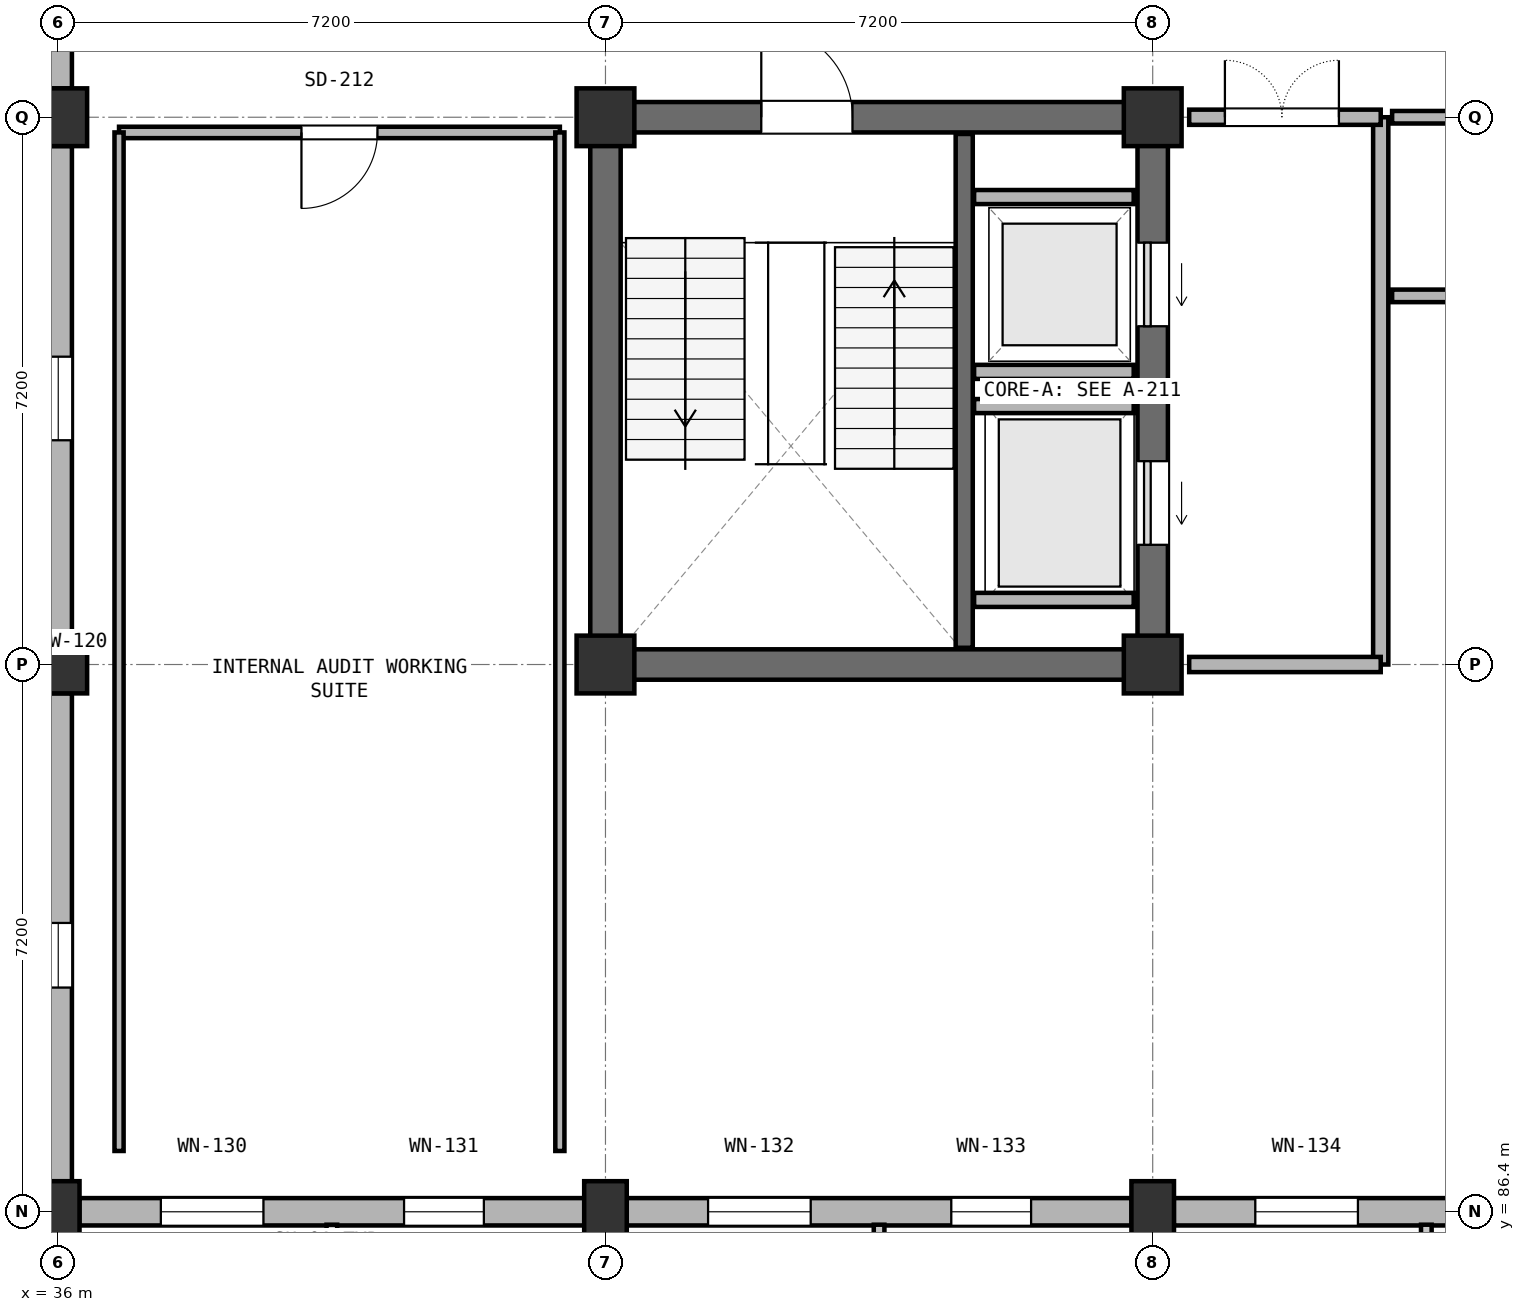
"""IFC4 building model, lengths in metres.
Left out: names, types, materials, properties, quantities, classifications, styles, units other than length and angle.
Written with IfcOpenShell. Run it as: python <this file> out.ifc"""

import sys

from ifc_helpers import new_model, si_unit, direction, frame, frame_2d, origin, origin_2d, place, context, subcontext, project, spatial, rectangle, extrude, element, fill, save


model = new_model("IFC4")
c1 = context("Model", 3, precision=1e-05, world=origin(), true_north=direction((0.0, 1.0)))
c2 = subcontext(c1, "Body", "Model", "MODEL_VIEW")
j1 = project(units=[si_unit("LENGTHUNIT", "METRE"), si_unit("PLANEANGLEUNIT", "RADIAN")], contexts=[c1])
p1 = place(None, origin())
s1 = spatial("IfcSite", under=j1, at=p1, CompositionType="ELEMENT")
p2 = place(p1, origin())
s2 = spatial("IfcBuilding", under=s1, at=p2, CompositionType="ELEMENT")
p3 = place(p2, frame((0.0, 0.0, 18.6)))
s3 = spatial("IfcBuildingStorey", under=s2, at=p3, CompositionType="ELEMENT", Elevation=18.6)
p4 = place(p3, frame((36.0, 86.4, 0.0), z_axis=(0.0, 0.0, 1.0), x_axis=(1.0, 0.0, 0.0)))
e1 = element("IfcColumn", 1, at=p4, inside=s3, PredefinedType="COLUMN", context=c2, shape_type="SweptSolid", body=[
    extrude(rectangle(XDim=0.56, YDim=0.805, at=origin_2d()), origin(), (0.0, 0.0, 1.0), 3.9),
])
for number, where, z_axis, x_axis in (
    (2, (36.0, 93.6, 0.0), (0.0, 0.0, 1.0), (1.0, 0.0, 0.0)),
    (3, (36.0, 100.8, 0.0), (0.0, 0.0, 1.0), (1.0, 0.0, 0.0)),
):
    element("IfcColumn", number, at=place(p3, frame(where, z_axis=z_axis, x_axis=x_axis)), inside=s3, PredefinedType="COLUMN", context=c2, shape_type="SweptSolid", body=[
        extrude(rectangle(XDim=0.76, YDim=0.76, at=origin_2d()), origin(), (0.0, 0.0, 1.0), 3.9),
    ])
p5 = place(p3, frame((43.2, 86.4, 0.0), z_axis=(0.0, 0.0, 1.0), x_axis=(1.0, 0.0, 0.0)))
e4 = element("IfcColumn", 4, at=p5, inside=s3, PredefinedType="COLUMN", context=c2, shape_type="SweptSolid", body=[
    extrude(rectangle(XDim=0.56, YDim=0.805, at=origin_2d()), origin(), (0.0, 0.0, 1.0), 3.9),
])
for number, where, z_axis, x_axis in (
    (5, (43.2, 93.6, 0.0), (0.0, 0.0, 1.0), (1.0, 0.0, 0.0)),
    (6, (43.2, 100.8, 0.0), (0.0, 0.0, 1.0), (1.0, 0.0, 0.0)),
):
    element("IfcColumn", number, at=place(p3, frame(where, z_axis=z_axis, x_axis=x_axis)), inside=s3, PredefinedType="COLUMN", context=c2, shape_type="SweptSolid", body=[
        extrude(rectangle(XDim=0.76, YDim=0.76, at=origin_2d()), origin(), (0.0, 0.0, 1.0), 3.9),
    ])
p6 = place(p3, frame((50.4, 86.4, 0.0), z_axis=(0.0, 0.0, 1.0), x_axis=(1.0, 0.0, 0.0)))
e7 = element("IfcColumn", 7, at=p6, inside=s3, PredefinedType="COLUMN", context=c2, shape_type="SweptSolid", body=[
    extrude(rectangle(XDim=0.56, YDim=0.805, at=origin_2d()), origin(), (0.0, 0.0, 1.0), 3.9),
])
for number, where, z_axis, x_axis in (
    (8, (50.4, 93.6, 0.0), (0.0, 0.0, 1.0), (1.0, 0.0, 0.0)),
    (9, (50.4, 100.8, 0.0), (0.0, 0.0, 1.0), (1.0, 0.0, 0.0)),
):
    element("IfcColumn", number, at=place(p3, frame(where, z_axis=z_axis, x_axis=x_axis)), inside=s3, PredefinedType="COLUMN", context=c2, shape_type="SweptSolid", body=[
        extrude(rectangle(XDim=0.76, YDim=0.76, at=origin_2d()), origin(), (0.0, 0.0, 1.0), 3.9),
    ])
p7 = place(p3, frame((43.55, 93.6, 0.0), z_axis=(0.0, 0.0, 1.0), x_axis=(1.0, 0.0, 0.0)))
e10 = element("IfcWall", 10, at=p7, inside=s3, PredefinedType="SHEAR", context=c2, shape_type="SweptSolid", body=[
    extrude(rectangle(XDim=6.5, YDim=0.4, at=frame_2d((3.25, 0.0))), origin(), (0.0, 0.0, 1.0), 3.9),
])
p8 = place(p3, frame((50.4, 93.95, 0.0), z_axis=(0.0, 0.0, 1.0), x_axis=(0.0, 1.0, 0.0)))
e11 = element("IfcWall", 11, at=p8, inside=s3, PredefinedType="SHEAR", context=c2, shape_type="SweptSolid", body=[
    extrude(rectangle(XDim=6.5, YDim=0.4, at=frame_2d((3.25, 0.0))), origin(), (0.0, 0.0, 1.0), 3.9),
])
p9 = place(p8, frame((1.225, 0.0, 0.0)))
e12 = element("IfcOpeningElement", 12, at=p9, cuts=e11, PredefinedType="OPENING", context=c2, shape_type="SweptSolid", body=[
    extrude(rectangle(XDim=1.1, YDim=2.2, at=frame_2d((0.55, 1.1))), frame((0.0, 0.21, 0.0), z_axis=(0.0, -1.0, 0.0), x_axis=(1.0, 0.0, 0.0)), (0.0, 0.0, 1.0), 0.42),
])
p10 = place(p8, frame((4.1, 0.0, 0.0)))
e13 = element("IfcOpeningElement", 13, at=p10, cuts=e11, PredefinedType="OPENING", context=c2, shape_type="SweptSolid", body=[
    extrude(rectangle(XDim=1.1, YDim=2.2, at=frame_2d((0.55, 1.1))), frame((0.0, 0.21, 0.0), z_axis=(0.0, -1.0, 0.0), x_axis=(1.0, 0.0, 0.0)), (0.0, 0.0, 1.0), 0.42),
])
p11 = place(p3, frame((50.05, 100.8, 0.0), z_axis=(0.0, 0.0, 1.0), x_axis=(-1.0, 0.0, 0.0)))
e14 = element("IfcWall", 14, at=p11, inside=s3, PredefinedType="SHEAR", context=c2, shape_type="SweptSolid", body=[
    extrude(rectangle(XDim=6.5, YDim=0.4, at=frame_2d((3.25, 0.0))), origin(), (0.0, 0.0, 1.0), 3.9),
])
p12 = place(p11, frame((3.6, 0.0, 0.0)))
e15 = element("IfcOpeningElement", 15, at=p12, cuts=e14, PredefinedType="OPENING", context=c2, shape_type="SweptSolid", body=[
    extrude(rectangle(XDim=1.2, YDim=2.2, at=frame_2d((0.6, 1.1))), frame((0.0, 0.21, 0.0), z_axis=(0.0, -1.0, 0.0), x_axis=(1.0, 0.0, 0.0)), (0.0, 0.0, 1.0), 0.42),
])
p13 = place(p3, frame((43.2, 100.45, 0.0), z_axis=(0.0, 0.0, 1.0), x_axis=(0.0, -1.0, 0.0)))
e16 = element("IfcWall", 16, at=p13, inside=s3, PredefinedType="SHEAR", context=c2, shape_type="SweptSolid", body=[
    extrude(rectangle(XDim=6.5, YDim=0.4, at=frame_2d((3.25, 0.0))), origin(), (0.0, 0.0, 1.0), 3.9),
])
p14 = place(p3, frame((47.92, 93.82, 0.0), z_axis=(0.0, 0.0, 1.0), x_axis=(0.0, 1.0, 0.0)))
e17 = element("IfcWall", 17, at=p14, inside=s3, PredefinedType="SHEAR", context=c2, shape_type="SweptSolid", body=[
    extrude(rectangle(XDim=6.76, YDim=0.225, at=frame_2d((3.38, 0.0))), origin(), (0.0, 0.0, 1.0), 3.9),
])
for number, where, z_axis, x_axis in (
    (18, (48.05, 94.45, 0.0), (0.0, 0.0, 1.0), (1.0, 0.0, 0.0)),
    (19, (48.05, 97.0, 0.0), (0.0, 0.0, 1.0), (1.0, 0.0, 0.0)),
    (20, (48.05, 97.45, 0.0), (0.0, 0.0, 1.0), (1.0, 0.0, 0.0)),
    (21, (48.05, 99.75, 0.0), (0.0, 0.0, 1.0), (1.0, 0.0, 0.0)),
):
    element("IfcWall", number, at=place(p3, frame(where, z_axis=z_axis, x_axis=x_axis)), inside=s3, PredefinedType="PARTITIONING", context=c2, shape_type="SweptSolid", body=[
        extrude(rectangle(XDim=2.1, YDim=0.185, at=frame_2d((1.05, 0.0))), origin(), (0.0, 0.0, 1.0), 3.9),
    ])
p15 = place(p3, frame((36.278, 86.4, 0.0), z_axis=(0.0, 0.0, 1.0), x_axis=(1.0, 0.0, 0.0)))
e22 = element("IfcWall", 22, at=p15, inside=s3, PredefinedType="SOLIDWALL", context=c2, shape_type="SweptSolid", body=[
    extrude(rectangle(XDim=6.644, YDim=0.36, at=frame_2d((3.322, 0.0))), origin(), (0.0, 0.0, 1.0), 2.74),
])
p16 = place(p15, frame((1.072, 0.0, 0.7)))
e23 = element("IfcOpeningElement", 23, at=p16, cuts=e22, PredefinedType="OPENING", context=c2, shape_type="SweptSolid", body=[
    extrude(rectangle(XDim=1.35, YDim=1.89, at=frame_2d((0.675, 0.945))), frame((0.0, 0.19, 0.0), z_axis=(0.0, -1.0, 0.0), x_axis=(1.0, 0.0, 0.0)), (0.0, 0.0, 1.0), 0.38),
])
p17 = place(p15, frame((4.272, 0.0, 0.7)))
e24 = element("IfcOpeningElement", 24, at=p17, cuts=e22, PredefinedType="OPENING", context=c2, shape_type="SweptSolid", body=[
    extrude(rectangle(XDim=1.05, YDim=1.89, at=frame_2d((0.525, 0.945))), frame((0.0, 0.19, 0.0), z_axis=(0.0, -1.0, 0.0), x_axis=(1.0, 0.0, 0.0)), (0.0, 0.0, 1.0), 0.38),
])
p18 = place(p3, frame((43.478, 86.4, 0.0), z_axis=(0.0, 0.0, 1.0), x_axis=(1.0, 0.0, 0.0)))
e25 = element("IfcWall", 25, at=p18, inside=s3, PredefinedType="SOLIDWALL", context=c2, shape_type="SweptSolid", body=[
    extrude(rectangle(XDim=6.644, YDim=0.36, at=frame_2d((3.322, 0.0))), origin(), (0.0, 0.0, 1.0), 2.74),
])
p19 = place(p18, frame((1.072, 0.0, 0.7)))
e26 = element("IfcOpeningElement", 26, at=p19, cuts=e25, PredefinedType="OPENING", context=c2, shape_type="SweptSolid", body=[
    extrude(rectangle(XDim=1.35, YDim=1.89, at=frame_2d((0.675, 0.945))), frame((0.0, 0.19, 0.0), z_axis=(0.0, -1.0, 0.0), x_axis=(1.0, 0.0, 0.0)), (0.0, 0.0, 1.0), 0.38),
])
p20 = place(p18, frame((4.272, 0.0, 0.7)))
e27 = element("IfcOpeningElement", 27, at=p20, cuts=e25, PredefinedType="OPENING", context=c2, shape_type="SweptSolid", body=[
    extrude(rectangle(XDim=1.05, YDim=1.89, at=frame_2d((0.525, 0.945))), frame((0.0, 0.19, 0.0), z_axis=(0.0, -1.0, 0.0), x_axis=(1.0, 0.0, 0.0)), (0.0, 0.0, 1.0), 0.38),
])
p21 = place(p3, frame((50.678, 86.4, 0.0), z_axis=(0.0, 0.0, 1.0), x_axis=(1.0, 0.0, 0.0)))
e28 = element("IfcWall", 28, at=p21, inside=s3, PredefinedType="SOLIDWALL", context=c2, shape_type="SweptSolid", body=[
    extrude(rectangle(XDim=6.644, YDim=0.36, at=frame_2d((3.322, 0.0))), origin(), (0.0, 0.0, 1.0), 2.74),
])
p22 = place(p21, frame((1.072, 0.0, 0.7)))
e29 = element("IfcOpeningElement", 29, at=p22, cuts=e28, PredefinedType="OPENING", context=c2, shape_type="SweptSolid", body=[
    extrude(rectangle(XDim=1.35, YDim=1.89, at=frame_2d((0.675, 0.945))), frame((0.0, 0.19, 0.0), z_axis=(0.0, -1.0, 0.0), x_axis=(1.0, 0.0, 0.0)), (0.0, 0.0, 1.0), 0.38),
])
p23 = place(p21, frame((4.272, 0.0, 0.7)))
e30 = element("IfcOpeningElement", 30, at=p23, cuts=e28, PredefinedType="OPENING", context=c2, shape_type="SweptSolid", body=[
    extrude(rectangle(XDim=1.05, YDim=1.89, at=frame_2d((0.525, 0.945))), frame((0.0, 0.19, 0.0), z_axis=(0.0, -1.0, 0.0), x_axis=(1.0, 0.0, 0.0)), (0.0, 0.0, 1.0), 0.38),
])
p24 = place(p3, frame((36.0, 86.801, 0.0), z_axis=(0.0, 0.0, 1.0), x_axis=(0.0, 1.0, 0.0)))
e31 = element("IfcWall", 31, at=p24, inside=s3, PredefinedType="SOLIDWALL", context=c2, shape_type="SweptSolid", body=[
    extrude(rectangle(XDim=6.421, YDim=0.36, at=frame_2d((3.211, 0.0))), origin(), (0.0, 0.0, 1.0), 2.74),
])
p25 = place(p24, frame((2.55, 0.0, 0.7)))
e32 = element("IfcOpeningElement", 32, at=p25, cuts=e31, PredefinedType="OPENING", context=c2, shape_type="SweptSolid", body=[
    extrude(rectangle(XDim=0.85, YDim=1.89, at=frame_2d((0.425, 0.945))), frame((0.0, 0.19, 0.0), z_axis=(0.0, -1.0, 0.0), x_axis=(1.0, 0.0, 0.0)), (0.0, 0.0, 1.0), 0.38),
])
p26 = place(p3, frame((36.0, 93.978, 0.0), z_axis=(0.0, 0.0, 1.0), x_axis=(0.0, 1.0, 0.0)))
e33 = element("IfcWall", 33, at=p26, inside=s3, PredefinedType="SOLIDWALL", context=c2, shape_type="SweptSolid", body=[
    extrude(rectangle(XDim=6.444, YDim=0.36, at=frame_2d((3.222, 0.0))), origin(), (0.0, 0.0, 1.0), 2.74),
])
p27 = place(p26, frame((2.572, 0.0, 0.7)))
e34 = element("IfcOpeningElement", 34, at=p27, cuts=e33, PredefinedType="OPENING", context=c2, shape_type="SweptSolid", body=[
    extrude(rectangle(XDim=1.1, YDim=1.89, at=frame_2d((0.55, 0.945))), frame((0.0, 0.19, 0.0), z_axis=(0.0, -1.0, 0.0), x_axis=(1.0, 0.0, 0.0)), (0.0, 0.0, 1.0), 0.38),
])
p28 = place(p3, frame((36.0, 101.178, 0.0), z_axis=(0.0, 0.0, 1.0), x_axis=(0.0, 1.0, 0.0)))
e35 = element("IfcWall", 35, at=p28, inside=s3, PredefinedType="SOLIDWALL", context=c2, shape_type="SweptSolid", body=[
    extrude(rectangle(XDim=6.444, YDim=0.36, at=frame_2d((3.222, 0.0))), origin(), (0.0, 0.0, 1.0), 2.74),
])
p29 = place(p28, frame((2.572, 0.0, 0.7)))
e36 = element("IfcOpeningElement", 36, at=p29, cuts=e35, PredefinedType="OPENING", context=c2, shape_type="SweptSolid", body=[
    extrude(rectangle(XDim=0.85, YDim=1.89, at=frame_2d((0.425, 0.945))), frame((0.0, 0.19, 0.0), z_axis=(0.0, -1.0, 0.0), x_axis=(1.0, 0.0, 0.0)), (0.0, 0.0, 1.0), 0.38),
])
p30 = place(p3, frame((53.4, 93.6, 0.0), z_axis=(0.0, 0.0, 1.0), x_axis=(0.0, 1.0, 0.0)))
e37 = element("IfcWall", 37, at=p30, inside=s3, PredefinedType="PARTITIONING", context=c2, shape_type="SweptSolid", body=[
    extrude(rectangle(XDim=7.2, YDim=0.2, at=frame_2d((3.6, 0.0))), origin(), (0.0, 0.0, 1.0), 2.78),
])
p31 = place(p3, frame((50.88, 93.6, 0.0), z_axis=(0.0, 0.0, 1.0), x_axis=(1.0, 0.0, 0.0)))
e38 = element("IfcWall", 38, at=p31, inside=s3, PredefinedType="PARTITIONING", context=c2, shape_type="SweptSolid", body=[
    extrude(rectangle(XDim=2.52, YDim=0.2, at=frame_2d((1.26, 0.0))), origin(), (0.0, 0.0, 1.0), 2.78),
])
p32 = place(p3, frame((53.4, 100.8, 0.0), z_axis=(0.0, 0.0, 1.0), x_axis=(-1.0, 0.0, 0.0)))
e39 = element("IfcWall", 39, at=p32, inside=s3, PredefinedType="PARTITIONING", context=c2, shape_type="SweptSolid", body=[
    extrude(rectangle(XDim=2.52, YDim=0.2, at=frame_2d((1.26, 0.0))), origin(), (0.0, 0.0, 1.0), 2.78),
])
p33 = place(p32, frame((0.55, 0.0, 0.0)))
e40 = element("IfcOpeningElement", 40, at=p33, cuts=e39, PredefinedType="OPENING", context=c2, shape_type="SweptSolid", body=[
    extrude(rectangle(XDim=1.5, YDim=2.2, at=frame_2d((0.75, 1.1))), frame((0.0, 0.11, 0.0), z_axis=(0.0, -1.0, 0.0), x_axis=(1.0, 0.0, 0.0)), (0.0, 0.0, 1.0), 0.22),
])
p34 = place(p3, frame((56.75, 100.8, 0.0), z_axis=(0.0, 0.0, 1.0), x_axis=(-1.0, 0.0, 0.0)))
e41 = element("IfcWall", 41, at=p34, inside=s3, PredefinedType="PARTITIONING", context=c2, shape_type="SweptSolid", body=[
    extrude(rectangle(XDim=3.2, YDim=0.165, at=frame_2d((1.6, 0.0))), origin(), (0.0, 0.0, 1.0), 2.78),
])
p35 = place(p34, frame((0.95, 0.0, 0.0)))
e42 = element("IfcOpeningElement", 42, at=p35, cuts=e41, PredefinedType="OPENING", context=c2, shape_type="SweptSolid", body=[
    extrude(rectangle(XDim=0.95, YDim=2.15, at=frame_2d((0.475, 1.075))), frame((0.0, 0.093, 0.0), z_axis=(0.0, -1.0, 0.0), x_axis=(1.0, 0.0, 0.0)), (0.0, 0.0, 1.0), 0.185),
])
p36 = place(p3, frame((53.55, 98.45, 0.0), z_axis=(0.0, 0.0, 1.0), x_axis=(1.0, 0.0, 0.0)))
e43 = element("IfcWall", 43, at=p36, inside=s3, PredefinedType="PARTITIONING", context=c2, shape_type="SweptSolid", body=[
    extrude(rectangle(XDim=3.2, YDim=0.165, at=frame_2d((1.6, 0.0))), origin(), (0.0, 0.0, 1.0), 2.78),
])
p37 = place(p3, frame((42.6, 100.6, 0.0), z_axis=(0.0, 0.0, 1.0), x_axis=(-1.0, 0.0, 0.0)))
e44 = element("IfcWall", 44, at=p37, inside=s3, PredefinedType="PARTITIONING", context=c2, shape_type="SweptSolid", body=[
    extrude(rectangle(XDim=5.8, YDim=0.15, at=frame_2d((2.9, 0.0))), origin(), (0.0, 0.0, 1.0), 2.78),
])
p38 = place(p37, frame((2.4, 0.0, 0.0)))
e45 = element("IfcOpeningElement", 45, at=p38, cuts=e44, PredefinedType="OPENING", context=c2, shape_type="SweptSolid", body=[
    extrude(rectangle(XDim=1.0, YDim=2.15, at=frame_2d((0.5, 1.075))), frame((0.0, 0.085, 0.0), z_axis=(0.0, -1.0, 0.0), x_axis=(1.0, 0.0, 0.0)), (0.0, 0.0, 1.0), 0.17),
])
for number, where, z_axis, x_axis in (
    (46, (36.8, 87.2, 0.0), (0.0, 0.0, 1.0), (0.0, 1.0, 0.0)),
    (47, (42.6, 100.6, 0.0), (0.0, 0.0, 1.0), (0.0, -1.0, 0.0)),
):
    element("IfcWall", number, at=place(p3, frame(where, z_axis=z_axis, x_axis=x_axis)), inside=s3, PredefinedType="PARTITIONING", context=c2, shape_type="SweptSolid", body=[
        extrude(rectangle(XDim=13.4, YDim=0.12, at=frame_2d((6.7, 0.0))), origin(), (0.0, 0.0, 1.0), 2.78),
    ])
p39 = place(p9, origin())
e48 = element("IfcDoor", 48, at=p39, inside=s3, OperationType="SLIDING_TO_LEFT", PredefinedType="DOOR", context=c2, shape_type="SweptSolid", body=[
    extrude(rectangle(XDim=1.1, YDim=2.2, at=frame_2d((0.55, 1.1))), frame((0.0, 0.025, 0.0), z_axis=(0.0, -1.0, 0.0), x_axis=(1.0, 0.0, 0.0)), (0.0, 0.0, 1.0), 0.05),
])
fill(e12, e48)
p40 = place(p10, origin())
e49 = element("IfcDoor", 49, at=p40, inside=s3, OperationType="SLIDING_TO_LEFT", PredefinedType="DOOR", context=c2, shape_type="SweptSolid", body=[
    extrude(rectangle(XDim=1.1, YDim=2.2, at=frame_2d((0.55, 1.1))), frame((0.0, 0.025, 0.0), z_axis=(0.0, -1.0, 0.0), x_axis=(1.0, 0.0, 0.0)), (0.0, 0.0, 1.0), 0.05),
])
fill(e13, e49)
p41 = place(p16, origin())
e50 = element("IfcWindow", 50, at=p41, inside=s3, PartitioningType="DOUBLE_PANEL_VERTICAL", PredefinedType="WINDOW", context=c2, shape_type="SweptSolid", body=[
    extrude(rectangle(XDim=1.35, YDim=1.89, at=frame_2d((0.675, 0.945))), frame((0.0, 0.03, 0.0), z_axis=(0.0, -1.0, 0.0), x_axis=(1.0, 0.0, 0.0)), (0.0, 0.0, 1.0), 0.06),
])
fill(e23, e50)
p42 = place(p17, origin())
e51 = element("IfcWindow", 51, at=p42, inside=s3, PartitioningType="SINGLE_PANEL", PredefinedType="WINDOW", context=c2, shape_type="SweptSolid", body=[
    extrude(rectangle(XDim=1.05, YDim=1.89, at=frame_2d((0.525, 0.945))), frame((0.0, 0.03, 0.0), z_axis=(0.0, -1.0, 0.0), x_axis=(1.0, 0.0, 0.0)), (0.0, 0.0, 1.0), 0.06),
])
fill(e24, e51)
p43 = place(p19, origin())
e52 = element("IfcWindow", 52, at=p43, inside=s3, PartitioningType="DOUBLE_PANEL_VERTICAL", PredefinedType="WINDOW", context=c2, shape_type="SweptSolid", body=[
    extrude(rectangle(XDim=1.35, YDim=1.89, at=frame_2d((0.675, 0.945))), frame((0.0, 0.03, 0.0), z_axis=(0.0, -1.0, 0.0), x_axis=(1.0, 0.0, 0.0)), (0.0, 0.0, 1.0), 0.06),
])
fill(e26, e52)
p44 = place(p20, origin())
e53 = element("IfcWindow", 53, at=p44, inside=s3, PartitioningType="SINGLE_PANEL", PredefinedType="WINDOW", context=c2, shape_type="SweptSolid", body=[
    extrude(rectangle(XDim=1.05, YDim=1.89, at=frame_2d((0.525, 0.945))), frame((0.0, 0.03, 0.0), z_axis=(0.0, -1.0, 0.0), x_axis=(1.0, 0.0, 0.0)), (0.0, 0.0, 1.0), 0.06),
])
fill(e27, e53)
p45 = place(p22, origin())
e54 = element("IfcWindow", 54, at=p45, inside=s3, PartitioningType="DOUBLE_PANEL_VERTICAL", PredefinedType="WINDOW", context=c2, shape_type="SweptSolid", body=[
    extrude(rectangle(XDim=1.35, YDim=1.89, at=frame_2d((0.675, 0.945))), frame((0.0, 0.03, 0.0), z_axis=(0.0, -1.0, 0.0), x_axis=(1.0, 0.0, 0.0)), (0.0, 0.0, 1.0), 0.06),
])
fill(e29, e54)
p46 = place(p25, origin())
e55 = element("IfcWindow", 55, at=p46, inside=s3, PartitioningType="SINGLE_PANEL", PredefinedType="WINDOW", context=c2, shape_type="SweptSolid", body=[
    extrude(rectangle(XDim=0.85, YDim=1.89, at=frame_2d((0.425, 0.945))), frame((0.0, 0.03, 0.0), z_axis=(0.0, -1.0, 0.0), x_axis=(1.0, 0.0, 0.0)), (0.0, 0.0, 1.0), 0.06),
])
fill(e32, e55)
p47 = place(p27, origin())
e56 = element("IfcWindow", 56, at=p47, inside=s3, PartitioningType="SINGLE_PANEL", PredefinedType="WINDOW", context=c2, shape_type="SweptSolid", body=[
    extrude(rectangle(XDim=1.1, YDim=1.89, at=frame_2d((0.55, 0.945))), frame((0.0, 0.03, 0.0), z_axis=(0.0, -1.0, 0.0), x_axis=(1.0, 0.0, 0.0)), (0.0, 0.0, 1.0), 0.06),
])
fill(e34, e56)
p48 = place(p12, frame((1.2, 0.0, 0.0), z_axis=(0.0, 0.0, 1.0), x_axis=(-1.0, 0.0, 0.0)))
e57 = element("IfcDoor", 57, at=p48, inside=s3, OperationType="SINGLE_SWING_LEFT", PredefinedType="DOOR", context=c2, shape_type="SweptSolid", body=[
    extrude(rectangle(XDim=1.2, YDim=2.2, at=frame_2d((0.6, 1.1))), frame((0.0, 0.025, 0.0), z_axis=(0.0, -1.0, 0.0), x_axis=(1.0, 0.0, 0.0)), (0.0, 0.0, 1.0), 0.05),
])
fill(e15, e57)
p49 = place(p33, frame((1.5, 0.0, 0.0), z_axis=(0.0, 0.0, 1.0), x_axis=(-1.0, 0.0, 0.0)))
e58 = element("IfcDoor", 58, at=p49, inside=s3, OperationType="DOUBLE_DOOR_SINGLE_SWING", PredefinedType="DOOR", context=c2, shape_type="SweptSolid", body=[
    extrude(rectangle(XDim=1.5, YDim=2.2, at=frame_2d((0.75, 1.1))), frame((0.0, 0.025, 0.0), z_axis=(0.0, -1.0, 0.0), x_axis=(1.0, 0.0, 0.0)), (0.0, 0.0, 1.0), 0.05),
])
fill(e40, e58)
p50 = place(p38, origin())
e59 = element("IfcDoor", 59, at=p50, inside=s3, OperationType="SINGLE_SWING_RIGHT", PredefinedType="DOOR", context=c2, shape_type="SweptSolid", body=[
    extrude(rectangle(XDim=1.0, YDim=2.15, at=frame_2d((0.5, 1.075))), frame((0.0, 0.025, 0.0), z_axis=(0.0, -1.0, 0.0), x_axis=(1.0, 0.0, 0.0)), (0.0, 0.0, 1.0), 0.05),
])
fill(e45, e59)
save(model, sys.argv[1])
